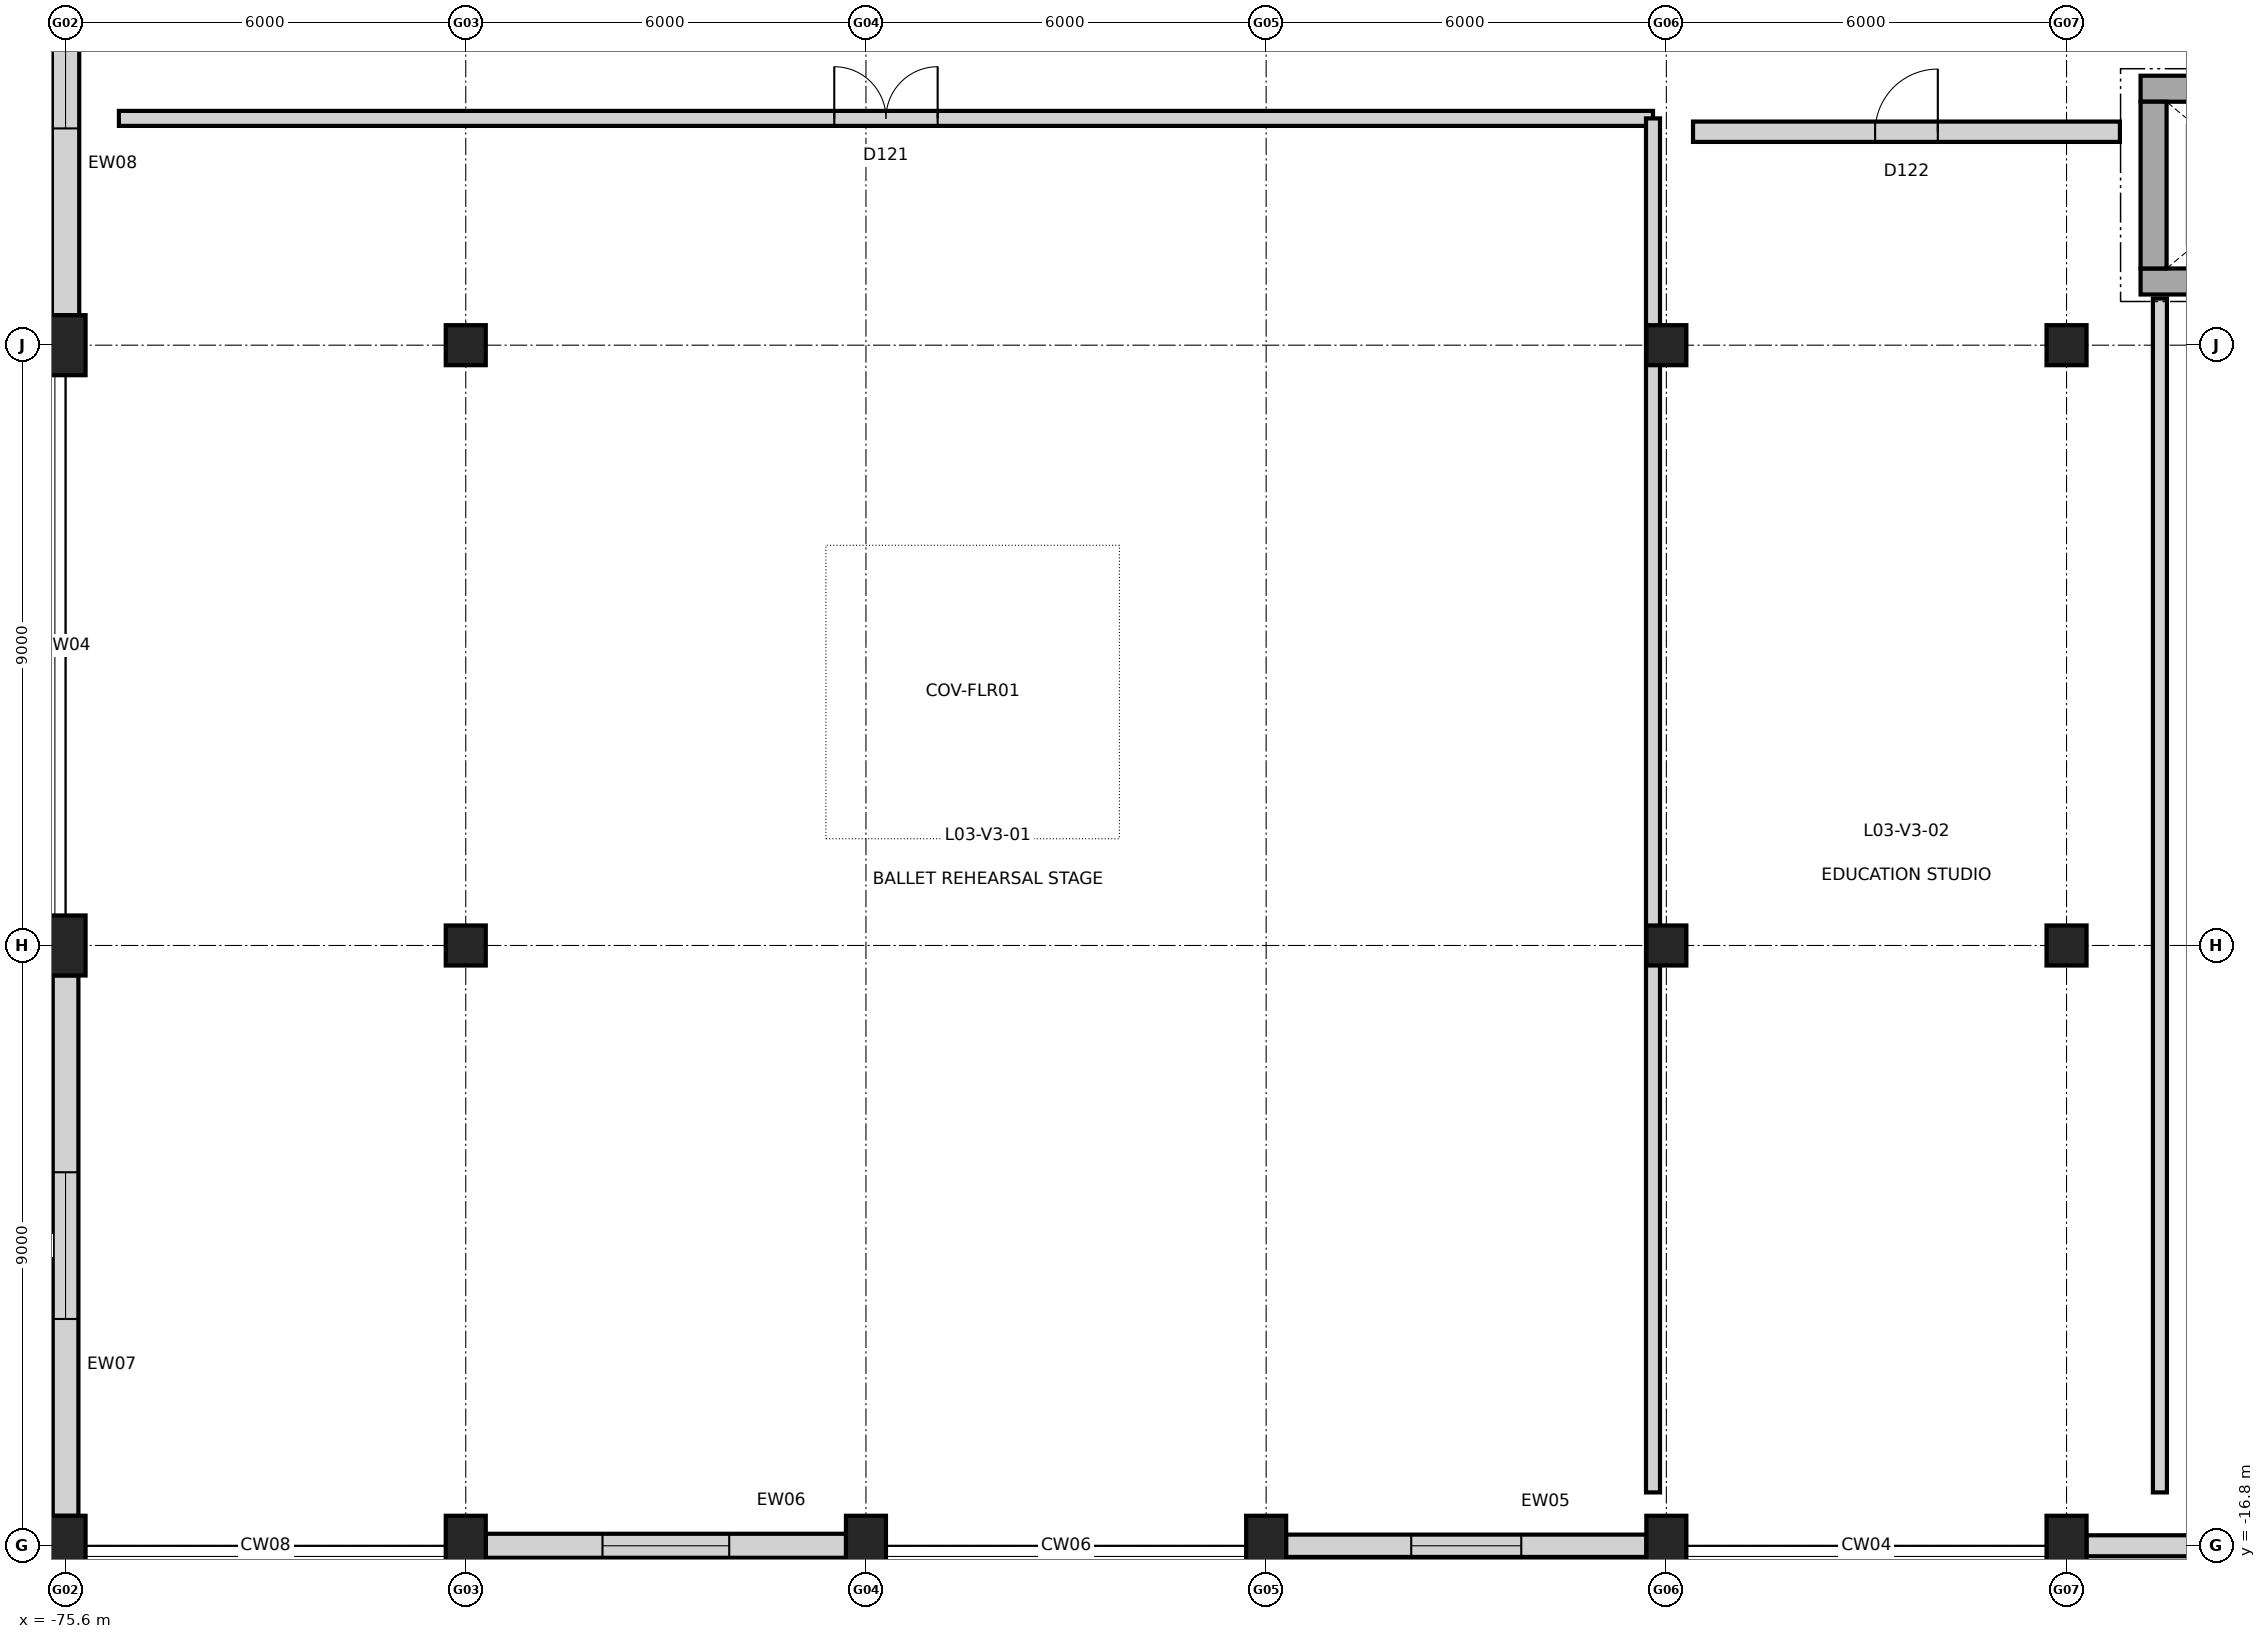
"""IFC4 building model, lengths in metres.
Left out: names, types, materials, properties, quantities, classifications, styles, units other than length and angle.
Written with IfcOpenShell. Run it as: python <this file> out.ifc"""

import sys

from ifc_helpers import new_model, si_unit, direction, frame, frame_2d, origin, origin_2d, place, context, subcontext, project, spatial, rectangle, extrude, element, fill, save


model = new_model("IFC4")
c1 = context("Model", 3, precision=1e-05, world=origin(), true_north=direction((0.0, 1.0)))
c2 = subcontext(c1, "Body", "Model", "MODEL_VIEW")
j1 = project(units=[si_unit("LENGTHUNIT", "METRE"), si_unit("PLANEANGLEUNIT", "RADIAN")], contexts=[c1])
p1 = place(None, origin())
s1 = spatial("IfcSite", under=j1, at=p1, CompositionType="ELEMENT")
p2 = place(p1, origin())
s2 = spatial("IfcBuilding", under=s1, at=p2, CompositionType="ELEMENT")
p3 = place(p2, frame((0.0, 0.0, 15.0)))
s3 = spatial("IfcBuildingStorey", under=s2, at=p3, CompositionType="ELEMENT", Elevation=15.0)
for number, where, z_axis, x_axis in (
    (1, (-75.6, -16.8, 0.0), (0.0, 0.0, 1.0), (1.0, 0.0, 0.0)),
    (2, (-75.6, -7.8, 0.0), (0.0, 0.0, 1.0), (1.0, 0.0, 0.0)),
    (3, (-75.6, 1.2, 0.0), (0.0, 0.0, 1.0), (1.0, 0.0, 0.0)),
    (4, (-69.6, -16.8, 0.0), (0.0, 0.0, 1.0), (1.0, 0.0, 0.0)),
):
    element("IfcColumn", number, at=place(p3, frame(where, z_axis=z_axis, x_axis=x_axis)), inside=s3, PredefinedType="COLUMN", context=c2, shape_type="SweptSolid", body=[
        extrude(rectangle(XDim=0.6, YDim=0.9, at=origin_2d()), origin(), (0.0, 0.0, 1.0), 4.8),
    ])
for number, where, z_axis, x_axis in (
    (5, (-69.6, -7.8, 0.0), (0.0, 0.0, 1.0), (1.0, 0.0, 0.0)),
    (6, (-69.6, 1.2, 0.0), (0.0, 0.0, 1.0), (1.0, 0.0, 0.0)),
):
    element("IfcColumn", number, at=place(p3, frame(where, z_axis=z_axis, x_axis=x_axis)), inside=s3, PredefinedType="COLUMN", context=c2, shape_type="SweptSolid", body=[
        extrude(rectangle(XDim=0.6, YDim=0.6, at=origin_2d()), origin(), (0.0, 0.0, 1.0), 4.8),
    ])
for number, where, z_axis, x_axis in (
    (7, (-63.6, -16.8, 0.0), (0.0, 0.0, 1.0), (1.0, 0.0, 0.0)),
    (8, (-57.6, -16.8, 0.0), (0.0, 0.0, 1.0), (1.0, 0.0, 0.0)),
    (9, (-51.6, -16.8, 0.0), (0.0, 0.0, 1.0), (1.0, 0.0, 0.0)),
):
    element("IfcColumn", number, at=place(p3, frame(where, z_axis=z_axis, x_axis=x_axis)), inside=s3, PredefinedType="COLUMN", context=c2, shape_type="SweptSolid", body=[
        extrude(rectangle(XDim=0.6, YDim=0.9, at=origin_2d()), origin(), (0.0, 0.0, 1.0), 4.8),
    ])
for number, where, z_axis, x_axis in (
    (10, (-51.6, -7.8, 0.0), (0.0, 0.0, 1.0), (1.0, 0.0, 0.0)),
    (11, (-51.6, 1.2, 0.0), (0.0, 0.0, 1.0), (1.0, 0.0, 0.0)),
):
    element("IfcColumn", number, at=place(p3, frame(where, z_axis=z_axis, x_axis=x_axis)), inside=s3, PredefinedType="COLUMN", context=c2, shape_type="SweptSolid", body=[
        extrude(rectangle(XDim=0.6, YDim=0.6, at=origin_2d()), origin(), (0.0, 0.0, 1.0), 4.8),
    ])
p4 = place(p3, frame((-45.6, -16.8, 0.0), z_axis=(0.0, 0.0, 1.0), x_axis=(1.0, 0.0, 0.0)))
e12 = element("IfcColumn", 12, at=p4, inside=s3, PredefinedType="COLUMN", context=c2, shape_type="SweptSolid", body=[
    extrude(rectangle(XDim=0.6, YDim=0.9, at=origin_2d()), origin(), (0.0, 0.0, 1.0), 4.8),
])
for number, where, z_axis, x_axis in (
    (13, (-45.6, -7.8, 0.0), (0.0, 0.0, 1.0), (1.0, 0.0, 0.0)),
    (14, (-45.6, 1.2, 0.0), (0.0, 0.0, 1.0), (1.0, 0.0, 0.0)),
):
    element("IfcColumn", number, at=place(p3, frame(where, z_axis=z_axis, x_axis=x_axis)), inside=s3, PredefinedType="COLUMN", context=c2, shape_type="SweptSolid", body=[
        extrude(rectangle(XDim=0.6, YDim=0.6, at=origin_2d()), origin(), (0.0, 0.0, 1.0), 4.8),
    ])
p5 = place(p3, frame((-39.898, -16.8, 0.0), z_axis=(0.0, 0.0, 1.0), x_axis=(-1.0, 0.0, 0.0)))
e15 = element("IfcWall", 15, at=p5, inside=s3, PredefinedType="STANDARD", context=c2, shape_type="SweptSolid", body=[
    extrude(rectangle(XDim=5.404, YDim=0.315, at=frame_2d((2.702, 0.0))), origin(), (0.0, 0.0, 1.0), 3.745),
])
p6 = place(p5, frame((1.977, 0.0, 0.85)))
e16 = element("IfcOpeningElement", 16, at=p6, cuts=e15, PredefinedType="OPENING", context=c2, shape_type="SweptSolid", body=[
    extrude(rectangle(XDim=1.45, YDim=2.1, at=frame_2d((0.725, 1.05))), frame((0.0, 0.167, 0.0), z_axis=(0.0, -1.0, 0.0), x_axis=(1.0, 0.0, 0.0)), (0.0, 0.0, 1.0), 0.335),
])
p7 = place(p3, frame((-51.898, -16.8, 0.0), z_axis=(0.0, 0.0, 1.0), x_axis=(-1.0, 0.0, 0.0)))
e17 = element("IfcWall", 17, at=p7, inside=s3, PredefinedType="STANDARD", context=c2, shape_type="SweptSolid", body=[
    extrude(rectangle(XDim=5.404, YDim=0.335, at=frame_2d((2.702, 0.0))), origin(), (0.0, 0.0, 1.0), 3.745),
])
p8 = place(p7, frame((1.877, 0.0, 0.85)))
e18 = element("IfcOpeningElement", 18, at=p8, cuts=e17, PredefinedType="OPENING", context=c2, shape_type="SweptSolid", body=[
    extrude(rectangle(XDim=1.65, YDim=2.1, at=frame_2d((0.825, 1.05))), frame((0.0, 0.177, 0.0), z_axis=(0.0, -1.0, 0.0), x_axis=(1.0, 0.0, 0.0)), (0.0, 0.0, 1.0), 0.355),
])
p9 = place(p3, frame((-63.898, -16.8, 0.0), z_axis=(0.0, 0.0, 1.0), x_axis=(-1.0, 0.0, 0.0)))
e19 = element("IfcWall", 19, at=p9, inside=s3, PredefinedType="STANDARD", context=c2, shape_type="SweptSolid", body=[
    extrude(rectangle(XDim=5.404, YDim=0.36, at=frame_2d((2.702, 0.0))), origin(), (0.0, 0.0, 1.0), 3.745),
])
p10 = place(p9, frame((1.752, 0.0, 0.85)))
e20 = element("IfcOpeningElement", 20, at=p10, cuts=e19, PredefinedType="OPENING", context=c2, shape_type="SweptSolid", body=[
    extrude(rectangle(XDim=1.9, YDim=2.1, at=frame_2d((0.95, 1.05))), frame((0.0, 0.19, 0.0), z_axis=(0.0, -1.0, 0.0), x_axis=(1.0, 0.0, 0.0)), (0.0, 0.0, 1.0), 0.38),
])
p11 = place(p3, frame((-75.6, -16.352, 0.0), z_axis=(0.0, 0.0, 1.0), x_axis=(0.0, 1.0, 0.0)))
e21 = element("IfcWall", 21, at=p11, inside=s3, PredefinedType="STANDARD", context=c2, shape_type="SweptSolid", body=[
    extrude(rectangle(XDim=8.104, YDim=0.385, at=frame_2d((4.052, 0.0))), origin(), (0.0, 0.0, 1.0), 3.829),
])
p12 = place(p11, frame((2.952, 0.0, 0.85)))
e22 = element("IfcOpeningElement", 22, at=p12, cuts=e21, PredefinedType="OPENING", context=c2, shape_type="SweptSolid", body=[
    extrude(rectangle(XDim=2.2, YDim=2.1, at=frame_2d((1.1, 1.05))), frame((0.0, 0.202, 0.0), z_axis=(0.0, -1.0, 0.0), x_axis=(1.0, 0.0, 0.0)), (0.0, 0.0, 1.0), 0.405),
])
p13 = place(p3, frame((-75.6, 1.648, 0.0), z_axis=(0.0, 0.0, 1.0), x_axis=(0.0, 1.0, 0.0)))
e23 = element("IfcWall", 23, at=p13, inside=s3, PredefinedType="STANDARD", context=c2, shape_type="SweptSolid", body=[
    extrude(rectangle(XDim=8.104, YDim=0.41, at=frame_2d((4.052, 0.0))), origin(), (0.0, 0.0, 1.0), 3.829),
])
p14 = place(p13, frame((2.802, 0.0, 0.85)))
e24 = element("IfcOpeningElement", 24, at=p14, cuts=e23, PredefinedType="OPENING", context=c2, shape_type="SweptSolid", body=[
    extrude(rectangle(XDim=2.5, YDim=2.1, at=frame_2d((1.25, 1.05))), frame((0.0, 0.215, 0.0), z_axis=(0.0, -1.0, 0.0), x_axis=(1.0, 0.0, 0.0)), (0.0, 0.0, 1.0), 0.43),
])
p15 = place(p3, frame((-40.71, 2.155, 0.0), z_axis=(0.0, 0.0, 1.0), x_axis=(-1.0, 0.0, 0.0)))
e25 = element("IfcWall", 25, at=p15, inside=s3, PredefinedType="SHEAR", context=c2, shape_type="SweptSolid", body=[
    extrude(rectangle(XDim=3.78, YDim=0.39, at=frame_2d((1.89, 0.0))), origin(), (0.0, 0.0, 1.0), 4.8),
])
p16 = place(p3, frame((-44.49, 5.045, 0.0), z_axis=(0.0, 0.0, 1.0), x_axis=(1.0, 0.0, 0.0)))
e26 = element("IfcWall", 26, at=p16, inside=s3, PredefinedType="SHEAR", context=c2, shape_type="SweptSolid", body=[
    extrude(rectangle(XDim=3.78, YDim=0.39, at=frame_2d((1.89, 0.0))), origin(), (0.0, 0.0, 1.0), 4.8),
])
p17 = place(p16, frame((1.19, 0.0, 0.0)))
e27 = element("IfcOpeningElement", 27, at=p17, cuts=e26, PredefinedType="OPENING", context=c2, shape_type="SweptSolid", body=[
    extrude(rectangle(XDim=1.4, YDim=2.2, at=frame_2d((0.7, 1.1))), frame((0.0, 0.205, 0.0), z_axis=(0.0, -1.0, 0.0), x_axis=(1.0, 0.0, 0.0)), (0.0, 0.0, 1.0), 0.41),
])
p18 = place(p3, frame((-44.295, 2.35, 0.0), z_axis=(0.0, 0.0, 1.0), x_axis=(0.0, 1.0, 0.0)))
e28 = element("IfcWall", 28, at=p18, inside=s3, PredefinedType="SHEAR", context=c2, shape_type="SweptSolid", body=[
    extrude(rectangle(XDim=2.5, YDim=0.39, at=frame_2d((1.25, 0.0))), origin(), (0.0, 0.0, 1.0), 4.8),
])
p19 = place(p3, frame((-74.8, 4.6, 0.0), z_axis=(0.0, 0.0, 1.0), x_axis=(1.0, 0.0, 0.0)))
e29 = element("IfcWall", 29, at=p19, inside=s3, PredefinedType="PARTITIONING", context=c2, shape_type="SweptSolid", body=[
    extrude(rectangle(XDim=23.0, YDim=0.225, at=frame_2d((11.5, 0.0))), origin(), (0.0, 0.0, 1.0), 4.42),
])
p20 = place(p19, frame((10.725, 0.0, 0.0)))
e30 = element("IfcOpeningElement", 30, at=p20, cuts=e29, PredefinedType="OPENING", context=c2, shape_type="SweptSolid", body=[
    extrude(rectangle(XDim=1.55, YDim=2.2, at=frame_2d((0.775, 1.1))), frame((0.0, 0.123, 0.0), z_axis=(0.0, -1.0, 0.0), x_axis=(1.0, 0.0, 0.0)), (0.0, 0.0, 1.0), 0.245),
])
p21 = place(p3, frame((-51.8, -16.0, 0.0), z_axis=(0.0, 0.0, 1.0), x_axis=(0.0, 1.0, 0.0)))
e31 = element("IfcWall", 31, at=p21, inside=s3, PredefinedType="PARTITIONING", context=c2, shape_type="SweptSolid", body=[
    extrude(rectangle(XDim=20.6, YDim=0.21, at=frame_2d((10.3, 0.0))), origin(), (0.0, 0.0, 1.0), 3.69),
])
p22 = place(p3, frame((-51.2, 4.4, 0.0), z_axis=(0.0, 0.0, 1.0), x_axis=(1.0, 0.0, 0.0)))
e32 = element("IfcWall", 32, at=p22, inside=s3, PredefinedType="PARTITIONING", context=c2, shape_type="SweptSolid", body=[
    extrude(rectangle(XDim=6.4, YDim=0.305, at=frame_2d((3.2, 0.0))), origin(), (0.0, 0.0, 1.0), 4.42),
])
p23 = place(p22, frame((2.73, 0.0, 0.0)))
e33 = element("IfcOpeningElement", 33, at=p23, cuts=e32, PredefinedType="OPENING", context=c2, shape_type="SweptSolid", body=[
    extrude(rectangle(XDim=0.94, YDim=2.1, at=frame_2d((0.47, 1.05))), frame((0.0, 0.162, 0.0), z_axis=(0.0, -1.0, 0.0), x_axis=(1.0, 0.0, 0.0)), (0.0, 0.0, 1.0), 0.325),
])
p24 = place(p3, frame((-44.2, -16.0, 0.0), z_axis=(0.0, 0.0, 1.0), x_axis=(0.0, 1.0, 0.0)))
e34 = element("IfcWall", 34, at=p24, inside=s3, PredefinedType="PARTITIONING", context=c2, shape_type="SweptSolid", body=[
    extrude(rectangle(XDim=17.9, YDim=0.21, at=frame_2d((8.95, 0.0))), origin(), (0.0, 0.0, 1.0), 4.42),
])
p25 = place(p8, origin())
e35 = element("IfcWindow", 35, at=p25, inside=s3, PartitioningType="SINGLE_PANEL", PredefinedType="WINDOW", context=c2, shape_type="SweptSolid", body=[
    extrude(rectangle(XDim=1.65, YDim=2.1, at=frame_2d((0.825, 1.05))), frame((0.0, 0.03, 0.0), z_axis=(0.0, -1.0, 0.0), x_axis=(1.0, 0.0, 0.0)), (0.0, 0.0, 1.0), 0.06),
])
fill(e18, e35)
p26 = place(p10, origin())
e36 = element("IfcWindow", 36, at=p26, inside=s3, PartitioningType="SINGLE_PANEL", PredefinedType="WINDOW", context=c2, shape_type="SweptSolid", body=[
    extrude(rectangle(XDim=1.9, YDim=2.1, at=frame_2d((0.95, 1.05))), frame((0.0, 0.03, 0.0), z_axis=(0.0, -1.0, 0.0), x_axis=(1.0, 0.0, 0.0)), (0.0, 0.0, 1.0), 0.06),
])
fill(e20, e36)
p27 = place(p12, origin())
e37 = element("IfcWindow", 37, at=p27, inside=s3, PartitioningType="SINGLE_PANEL", PredefinedType="WINDOW", context=c2, shape_type="SweptSolid", body=[
    extrude(rectangle(XDim=2.2, YDim=2.1, at=frame_2d((1.1, 1.05))), frame((0.0, 0.03, 0.0), z_axis=(0.0, -1.0, 0.0), x_axis=(1.0, 0.0, 0.0)), (0.0, 0.0, 1.0), 0.06),
])
fill(e22, e37)
p28 = place(p14, origin())
e38 = element("IfcWindow", 38, at=p28, inside=s3, PartitioningType="SINGLE_PANEL", PredefinedType="WINDOW", context=c2, shape_type="SweptSolid", body=[
    extrude(rectangle(XDim=2.5, YDim=2.1, at=frame_2d((1.25, 1.05))), frame((0.0, 0.03, 0.0), z_axis=(0.0, -1.0, 0.0), x_axis=(1.0, 0.0, 0.0)), (0.0, 0.0, 1.0), 0.06),
])
fill(e24, e38)
p29 = place(p20, origin())
e39 = element("IfcDoor", 39, at=p29, inside=s3, OperationType="DOUBLE_DOOR_SINGLE_SWING", PredefinedType="DOOR", context=c2, shape_type="SweptSolid", body=[
    extrude(rectangle(XDim=1.55, YDim=2.2, at=frame_2d((0.775, 1.1))), frame((0.0, 0.025, 0.0), z_axis=(0.0, -1.0, 0.0), x_axis=(1.0, 0.0, 0.0)), (0.0, 0.0, 1.0), 0.05),
])
fill(e30, e39)
p30 = place(p23, origin())
e40 = element("IfcDoor", 40, at=p30, inside=s3, OperationType="SINGLE_SWING_RIGHT", PredefinedType="DOOR", context=c2, shape_type="SweptSolid", body=[
    extrude(rectangle(XDim=0.94, YDim=2.1, at=frame_2d((0.47, 1.05))), frame((0.0, 0.025, 0.0), z_axis=(0.0, -1.0, 0.0), x_axis=(1.0, 0.0, 0.0)), (0.0, 0.0, 1.0), 0.05),
])
fill(e33, e40)
save(model, sys.argv[1])
